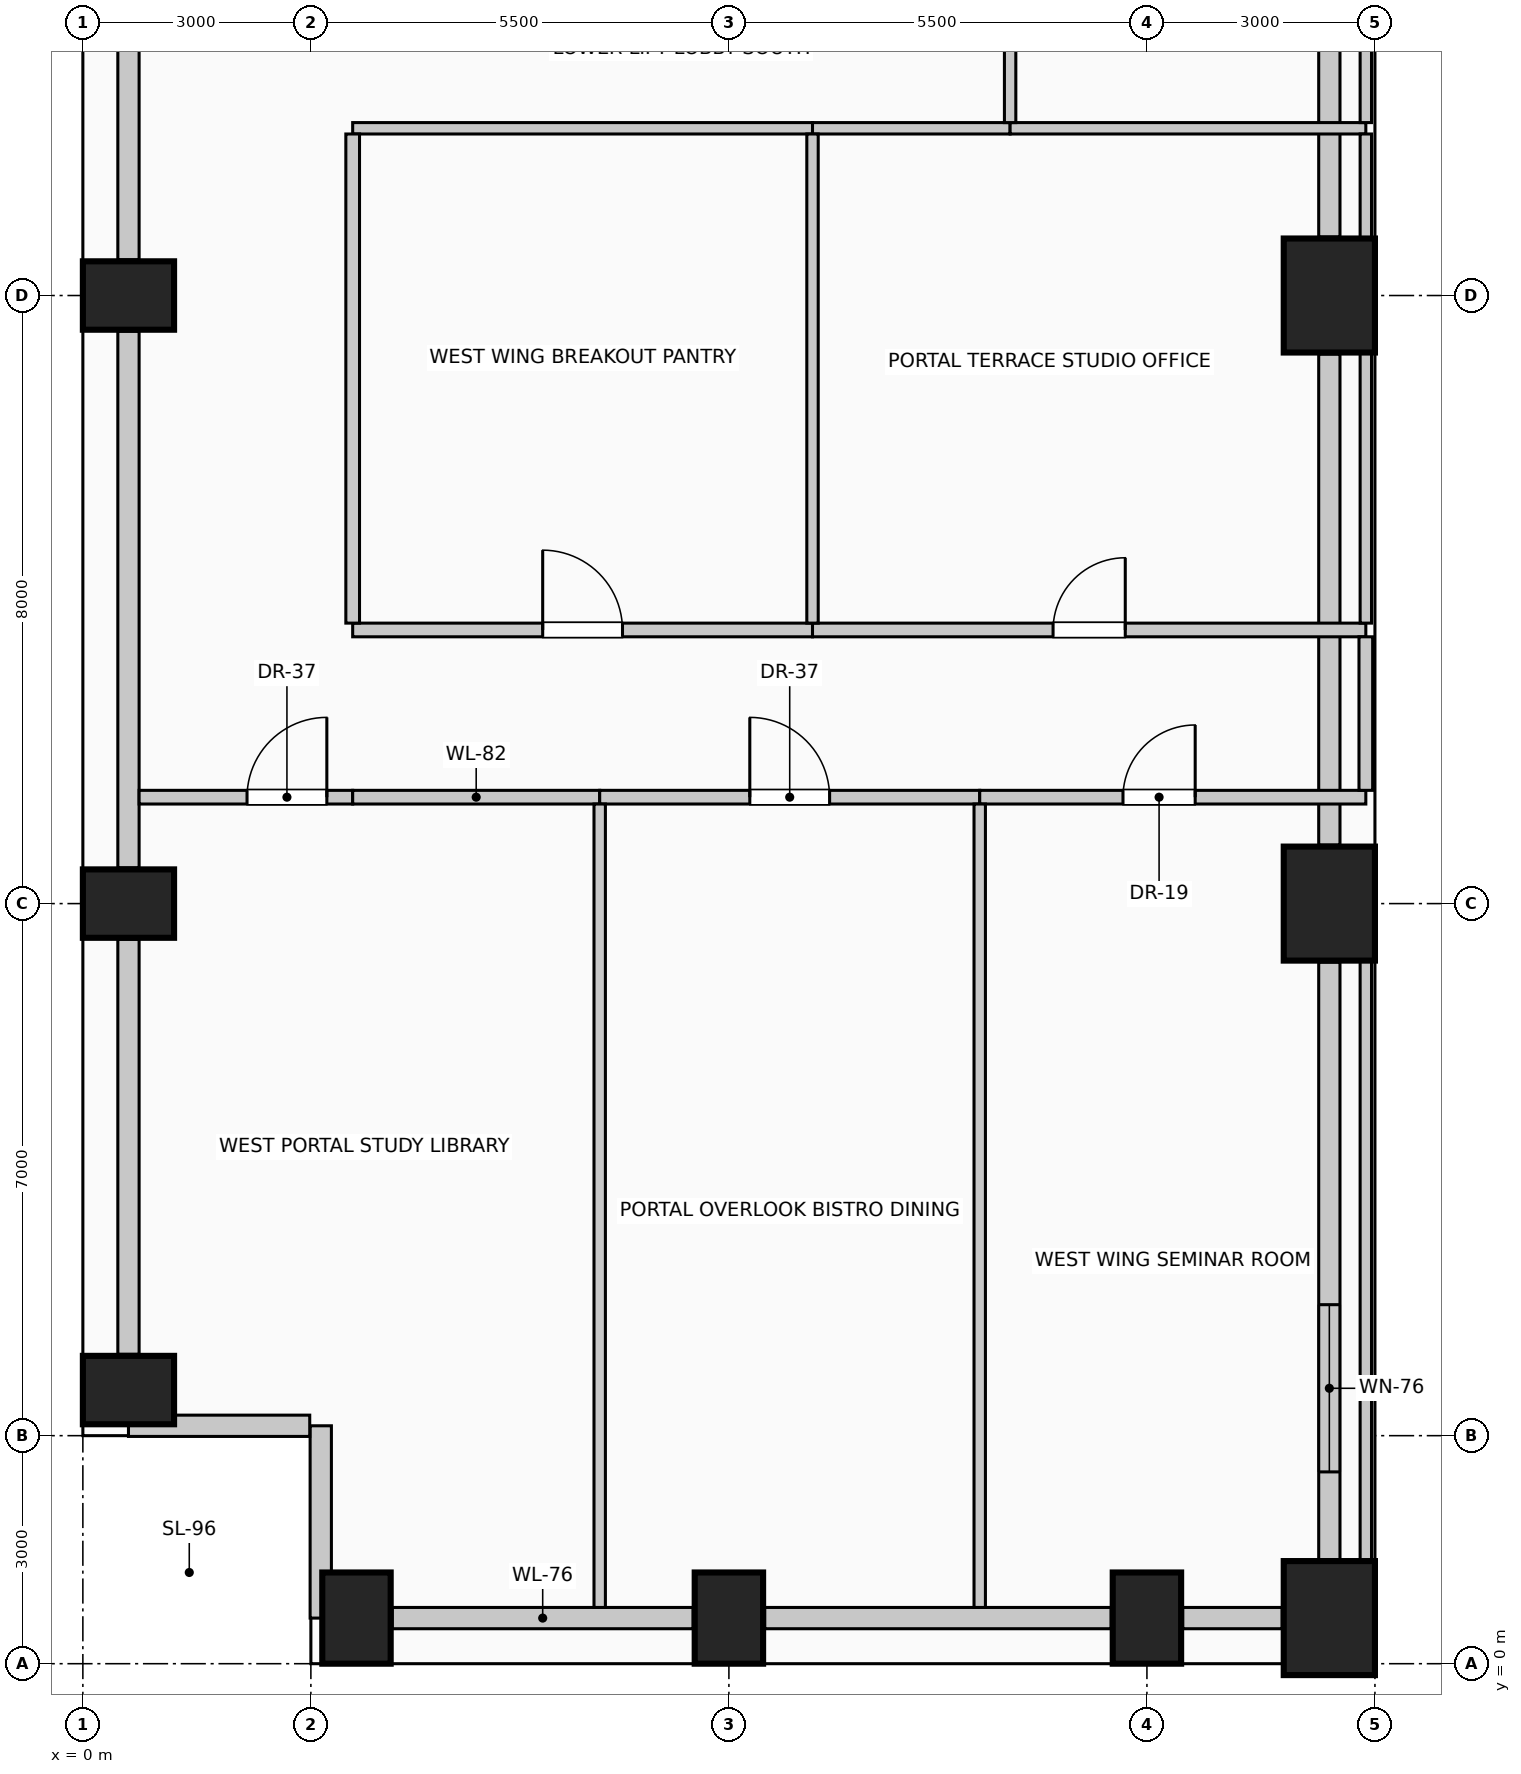
"""IFC4 building model, lengths in metres.
Left out: names, types, materials, properties, quantities, classifications, styles, units other than length and angle.
Written with IfcOpenShell. Run it as: python <this file> out.ifc"""

import sys

from ifc_helpers import new_model, si_unit, direction, frame, frame_2d, origin, origin_2d, place, context, subcontext, project, spatial, rectangle, extrude, element, fill, save


model = new_model("IFC4")
c1 = context("Model", 3, precision=1e-05, world=origin(), true_north=direction((0.0, 1.0)))
c2 = subcontext(c1, "Body", "Model", "MODEL_VIEW")
j1 = project(units=[si_unit("LENGTHUNIT", "METRE"), si_unit("PLANEANGLEUNIT", "RADIAN")], contexts=[c1])
p1 = place(None, origin())
s1 = spatial("IfcSite", under=j1, at=p1, CompositionType="ELEMENT")
p2 = place(p1, origin())
s2 = spatial("IfcBuilding", under=s1, at=p2, CompositionType="ELEMENT")
p3 = place(p2, frame((0.0, 0.0, 34.6)))
s3 = spatial("IfcBuildingStorey", under=s2, at=p3, CompositionType="ELEMENT", Elevation=34.6)
for number, where, z_axis, x_axis in (
    (1, (3.6, 0.6, 0.0), (0.0, 0.0, 1.0), (1.0, 0.0, 0.0)),
    (2, (8.5, 0.6, 0.0), (0.0, 0.0, 1.0), (1.0, 0.0, 0.0)),
    (3, (14.0, 0.6, 0.0), (0.0, 0.0, 1.0), (1.0, 0.0, 0.0)),
):
    element("IfcColumn", number, at=place(p3, frame(where, z_axis=z_axis, x_axis=x_axis)), inside=s3, PredefinedType="COLUMN", context=c2, shape_type="SweptSolid", body=[
        extrude(rectangle(XDim=0.9, YDim=1.2, at=origin_2d()), origin(), (0.0, 0.0, 1.0), 4.0),
    ])
p4 = place(p3, frame((16.4, 0.6, 0.0), z_axis=(0.0, 0.0, 1.0), x_axis=(1.0, 0.0, 0.0)))
e4 = element("IfcColumn", 4, at=p4, inside=s3, PredefinedType="COLUMN", context=c2, shape_type="SweptSolid", body=[
    extrude(rectangle(XDim=1.2, YDim=1.5, at=origin_2d()), origin(), (0.0, 0.0, 1.0), 4.0),
])
for number, where, z_axis, x_axis in (
    (5, (0.6, 3.6, 0.0), (0.0, 0.0, 1.0), (0.0, 1.0, 0.0)),
    (6, (0.6, 10.0, 0.0), (0.0, 0.0, 1.0), (0.0, 1.0, 0.0)),
    (7, (0.6, 18.0, 0.0), (0.0, 0.0, 1.0), (0.0, 1.0, 0.0)),
):
    element("IfcColumn", number, at=place(p3, frame(where, z_axis=z_axis, x_axis=x_axis)), inside=s3, PredefinedType="COLUMN", context=c2, shape_type="SweptSolid", body=[
        extrude(rectangle(XDim=0.9, YDim=1.2, at=origin_2d()), origin(), (0.0, 0.0, 1.0), 4.0),
    ])
for number, where, z_axis, x_axis in (
    (8, (16.4, 10.0, 0.0), (0.0, 0.0, 1.0), (1.0, 0.0, 0.0)),
    (9, (16.4, 18.0, 0.0), (0.0, 0.0, 1.0), (1.0, 0.0, 0.0)),
):
    element("IfcColumn", number, at=place(p3, frame(where, z_axis=z_axis, x_axis=x_axis)), inside=s3, PredefinedType="COLUMN", context=c2, shape_type="SweptSolid", body=[
        extrude(rectangle(XDim=1.2, YDim=1.5, at=origin_2d()), origin(), (0.0, 0.0, 1.0), 4.0),
    ])
p5 = place(p3, frame((8.03, 0.6, 0.0), z_axis=(0.0, 0.0, 1.0), x_axis=(-1.0, 0.0, 0.0)))
e10 = element("IfcWall", 10, at=p5, inside=s3, PredefinedType="SOLIDWALL", context=c2, shape_type="SweptSolid", body=[
    extrude(rectangle(XDim=3.96, YDim=0.28, at=frame_2d((1.98, 0.0))), origin(), (0.0, 0.0, 1.0), 2.85),
])
p6 = place(p3, frame((13.53, 0.6, 0.0), z_axis=(0.0, 0.0, 1.0), x_axis=(-1.0, 0.0, 0.0)))
e11 = element("IfcWall", 11, at=p6, inside=s3, PredefinedType="SOLIDWALL", context=c2, shape_type="SweptSolid", body=[
    extrude(rectangle(XDim=4.56, YDim=0.28, at=frame_2d((2.28, 0.0))), origin(), (0.0, 0.0, 1.0), 2.85),
])
p7 = place(p3, frame((15.78, 0.6, 0.0), z_axis=(0.0, 0.0, 1.0), x_axis=(-1.0, 0.0, 0.0)))
e12 = element("IfcWall", 12, at=p7, inside=s3, PredefinedType="SOLIDWALL", context=c2, shape_type="SweptSolid", body=[
    extrude(rectangle(XDim=1.31, YDim=0.28, at=frame_2d((0.655, 0.0))), origin(), (0.0, 0.0, 1.0), 2.85),
])
p8 = place(p3, frame((0.6, 4.07, 0.0), z_axis=(0.0, 0.0, 1.0), x_axis=(0.0, 1.0, 0.0)))
e13 = element("IfcWall", 13, at=p8, inside=s3, PredefinedType="SOLIDWALL", context=c2, shape_type="SweptSolid", body=[
    extrude(rectangle(XDim=5.46, YDim=0.28, at=frame_2d((2.73, 0.0))), origin(), (0.0, 0.0, 1.0), 2.85),
])
for number, where, z_axis, x_axis in (
    (14, (0.6, 10.47, 0.0), (0.0, 0.0, 1.0), (0.0, 1.0, 0.0)),
    (15, (0.6, 18.47, 0.0), (0.0, 0.0, 1.0), (0.0, 1.0, 0.0)),
):
    element("IfcWall", number, at=place(p3, frame(where, z_axis=z_axis, x_axis=x_axis)), inside=s3, PredefinedType="SOLIDWALL", context=c2, shape_type="SweptSolid", body=[
        extrude(rectangle(XDim=7.06, YDim=0.28, at=frame_2d((3.53, 0.0))), origin(), (0.0, 0.0, 1.0), 2.85),
    ])
p9 = place(p3, frame((3.13, 0.6, 0.0), z_axis=(0.0, 0.0, 1.0), x_axis=(0.0, 1.0, 0.0)))
e16 = element("IfcWall", 16, at=p9, inside=s3, PredefinedType="SOLIDWALL", context=c2, shape_type="SweptSolid", body=[
    extrude(rectangle(XDim=2.53, YDim=0.28, at=frame_2d((1.265, 0.0))), origin(), (0.0, 0.0, 1.0), 3.7),
])
p10 = place(p3, frame((2.985, 3.13, 0.0), z_axis=(0.0, 0.0, 1.0), x_axis=(-1.0, 0.0, 0.0)))
e17 = element("IfcWall", 17, at=p10, inside=s3, PredefinedType="SOLIDWALL", context=c2, shape_type="SweptSolid", body=[
    extrude(rectangle(XDim=2.385, YDim=0.28, at=frame_2d((1.192, 0.0))), origin(), (0.0, 0.0, 1.0), 3.7),
])
p11 = place(p3, frame((16.4, 9.23, 0.0), z_axis=(0.0, 0.0, 1.0), x_axis=(0.0, -1.0, 0.0)))
e18 = element("IfcWall", 18, at=p11, inside=s3, PredefinedType="SOLIDWALL", context=c2, shape_type="SweptSolid", body=[
    extrude(rectangle(XDim=7.86, YDim=0.28, at=frame_2d((3.93, 0.0))), origin(), (0.0, 0.0, 1.0), 3.0),
])
p12 = place(p11, frame((4.507, 0.0, 0.42)))
e19 = element("IfcOpeningElement", 19, at=p12, cuts=e18, PredefinedType="OPENING", context=c2, shape_type="SweptSolid", body=[
    extrude(rectangle(XDim=2.2, YDim=1.95, at=frame_2d((1.1, 0.975))), frame((0.0, 0.15, 0.0), z_axis=(0.0, -1.0, 0.0), x_axis=(1.0, 0.0, 0.0)), (0.0, 0.0, 1.0), 0.3),
])
for number, where, z_axis, x_axis in (
    (20, (16.4, 17.23, 0.0), (0.0, 0.0, 1.0), (0.0, -1.0, 0.0)),
    (21, (16.4, 25.23, 0.0), (0.0, 0.0, 1.0), (0.0, -1.0, 0.0)),
):
    element("IfcWall", number, at=place(p3, frame(where, z_axis=z_axis, x_axis=x_axis)), inside=s3, PredefinedType="SOLIDWALL", context=c2, shape_type="SweptSolid", body=[
        extrude(rectangle(XDim=6.46, YDim=0.28, at=frame_2d((3.23, 0.0))), origin(), (0.0, 0.0, 1.0), 3.0),
    ])
p13 = place(p3, frame((0.74, 11.4, 0.0), z_axis=(0.0, 0.0, 1.0), x_axis=(1.0, 0.0, 0.0)))
e22 = element("IfcWall", 22, at=p13, inside=s3, PredefinedType="PARTITIONING", context=c2, shape_type="SweptSolid", body=[
    extrude(rectangle(XDim=2.81, YDim=0.18, at=frame_2d((1.405, 0.0))), origin(), (0.0, 0.0, 1.0), 3.095),
])
p14 = place(p13, frame((1.42, 0.0, 0.0)))
e23 = element("IfcOpeningElement", 23, at=p14, cuts=e22, PredefinedType="OPENING", context=c2, shape_type="SweptSolid", body=[
    extrude(rectangle(XDim=1.05, YDim=2.15, at=frame_2d((0.525, 1.075))), frame((0.0, 0.1, 0.0), z_axis=(0.0, -1.0, 0.0), x_axis=(1.0, 0.0, 0.0)), (0.0, 0.0, 1.0), 0.2),
])
p15 = place(p3, frame((3.55, 11.4, 0.0), z_axis=(0.0, 0.0, 1.0), x_axis=(1.0, 0.0, 0.0)))
e24 = element("IfcWall", 24, at=p15, inside=s3, PredefinedType="PARTITIONING", context=c2, shape_type="SweptSolid", body=[
    extrude(rectangle(XDim=3.25, YDim=0.18, at=frame_2d((1.625, 0.0))), origin(), (0.0, 0.0, 1.0), 3.095),
])
p16 = place(p3, frame((6.8, 11.4, 0.0), z_axis=(0.0, 0.0, 1.0), x_axis=(1.0, 0.0, 0.0)))
e25 = element("IfcWall", 25, at=p16, inside=s3, PredefinedType="PARTITIONING", context=c2, shape_type="SweptSolid", body=[
    extrude(rectangle(XDim=5.0, YDim=0.18, at=frame_2d((2.5, 0.0))), origin(), (0.0, 0.0, 1.0), 3.095),
])
p17 = place(p16, frame((1.975, 0.0, 0.0)))
e26 = element("IfcOpeningElement", 26, at=p17, cuts=e25, PredefinedType="OPENING", context=c2, shape_type="SweptSolid", body=[
    extrude(rectangle(XDim=1.05, YDim=2.15, at=frame_2d((0.525, 1.075))), frame((0.0, 0.1, 0.0), z_axis=(0.0, -1.0, 0.0), x_axis=(1.0, 0.0, 0.0)), (0.0, 0.0, 1.0), 0.2),
])
p18 = place(p3, frame((11.8, 11.4, 0.0), z_axis=(0.0, 0.0, 1.0), x_axis=(1.0, 0.0, 0.0)))
e27 = element("IfcWall", 27, at=p18, inside=s3, PredefinedType="PARTITIONING", context=c2, shape_type="SweptSolid", body=[
    extrude(rectangle(XDim=5.08, YDim=0.18, at=frame_2d((2.54, 0.0))), origin(), (0.0, 0.0, 1.0), 3.095),
])
p19 = place(p18, frame((1.885, 0.0, 0.0)))
e28 = element("IfcOpeningElement", 28, at=p19, cuts=e27, PredefinedType="OPENING", context=c2, shape_type="SweptSolid", body=[
    extrude(rectangle(XDim=0.95, YDim=2.15, at=frame_2d((0.475, 1.075))), frame((0.0, 0.1, 0.0), z_axis=(0.0, -1.0, 0.0), x_axis=(1.0, 0.0, 0.0)), (0.0, 0.0, 1.0), 0.2),
])
p20 = place(p3, frame((3.55, 13.6, 0.0), z_axis=(0.0, 0.0, 1.0), x_axis=(1.0, 0.0, 0.0)))
e29 = element("IfcWall", 29, at=p20, inside=s3, PredefinedType="PARTITIONING", context=c2, shape_type="SweptSolid", body=[
    extrude(rectangle(XDim=6.05, YDim=0.18, at=frame_2d((3.025, 0.0))), origin(), (0.0, 0.0, 1.0), 3.7),
])
p21 = place(p20, frame((2.5, 0.0, 0.0)))
e30 = element("IfcOpeningElement", 30, at=p21, cuts=e29, PredefinedType="OPENING", context=c2, shape_type="SweptSolid", body=[
    extrude(rectangle(XDim=1.05, YDim=2.15, at=frame_2d((0.525, 1.075))), frame((0.0, 0.1, 0.0), z_axis=(0.0, -1.0, 0.0), x_axis=(1.0, 0.0, 0.0)), (0.0, 0.0, 1.0), 0.2),
])
p22 = place(p3, frame((9.6, 13.6, 0.0), z_axis=(0.0, 0.0, 1.0), x_axis=(1.0, 0.0, 0.0)))
e31 = element("IfcWall", 31, at=p22, inside=s3, PredefinedType="PARTITIONING", context=c2, shape_type="SweptSolid", body=[
    extrude(rectangle(XDim=7.28, YDim=0.18, at=frame_2d((3.64, 0.0))), origin(), (0.0, 0.0, 1.0), 3.7),
])
p23 = place(p22, frame((3.165, 0.0, 0.0)))
e32 = element("IfcOpeningElement", 32, at=p23, cuts=e31, PredefinedType="OPENING", context=c2, shape_type="SweptSolid", body=[
    extrude(rectangle(XDim=0.95, YDim=2.15, at=frame_2d((0.475, 1.075))), frame((0.0, 0.1, 0.0), z_axis=(0.0, -1.0, 0.0), x_axis=(1.0, 0.0, 0.0)), (0.0, 0.0, 1.0), 0.2),
])
p24 = place(p3, frame((3.55, 20.2, 0.0), z_axis=(0.0, 0.0, 1.0), x_axis=(1.0, 0.0, 0.0)))
e33 = element("IfcWall", 33, at=p24, inside=s3, PredefinedType="PARTITIONING", context=c2, shape_type="SweptSolid", body=[
    extrude(rectangle(XDim=6.05, YDim=0.15, at=frame_2d((3.025, 0.0))), origin(), (0.0, 0.0, 1.0), 3.7),
])
p25 = place(p3, frame((9.6, 20.2, 0.0), z_axis=(0.0, 0.0, 1.0), x_axis=(1.0, 0.0, 0.0)))
e34 = element("IfcWall", 34, at=p25, inside=s3, PredefinedType="PARTITIONING", context=c2, shape_type="SweptSolid", body=[
    extrude(rectangle(XDim=2.6, YDim=0.15, at=frame_2d((1.3, 0.0))), origin(), (0.0, 0.0, 1.0), 3.7),
])
p26 = place(p3, frame((12.2, 20.2, 0.0), z_axis=(0.0, 0.0, 1.0), x_axis=(1.0, 0.0, 0.0)))
e35 = element("IfcWall", 35, at=p26, inside=s3, PredefinedType="PARTITIONING", context=c2, shape_type="SweptSolid", body=[
    extrude(rectangle(XDim=4.68, YDim=0.15, at=frame_2d((2.34, 0.0))), origin(), (0.0, 0.0, 1.0), 3.7),
])
p27 = place(p3, frame((3.55, 13.69, 0.0), z_axis=(0.0, 0.0, 1.0), x_axis=(0.0, 1.0, 0.0)))
e36 = element("IfcWall", 36, at=p27, inside=s3, PredefinedType="PARTITIONING", context=c2, shape_type="SweptSolid", body=[
    extrude(rectangle(XDim=6.435, YDim=0.18, at=frame_2d((3.218, 0.0))), origin(), (0.0, 0.0, 1.0), 3.7),
])
p28 = place(p3, frame((6.8, 0.74, 0.0), z_axis=(0.0, 0.0, 1.0), x_axis=(0.0, 1.0, 0.0)))
e37 = element("IfcWall", 37, at=p28, inside=s3, PredefinedType="PARTITIONING", context=c2, shape_type="SweptSolid", body=[
    extrude(rectangle(XDim=10.57, YDim=0.15, at=frame_2d((5.285, 0.0))), origin(), (0.0, 0.0, 1.0), 3.7),
])
p29 = place(p3, frame((9.6, 13.69, 0.0), z_axis=(0.0, 0.0, 1.0), x_axis=(0.0, 1.0, 0.0)))
e38 = element("IfcWall", 38, at=p29, inside=s3, PredefinedType="PARTITIONING", context=c2, shape_type="SweptSolid", body=[
    extrude(rectangle(XDim=6.435, YDim=0.15, at=frame_2d((3.218, 0.0))), origin(), (0.0, 0.0, 1.0), 3.7),
])
p30 = place(p3, frame((11.8, 0.74, 0.0), z_axis=(0.0, 0.0, 1.0), x_axis=(0.0, 1.0, 0.0)))
e39 = element("IfcWall", 39, at=p30, inside=s3, PredefinedType="PARTITIONING", context=c2, shape_type="SweptSolid", body=[
    extrude(rectangle(XDim=10.57, YDim=0.15, at=frame_2d((5.285, 0.0))), origin(), (0.0, 0.0, 1.0), 3.7),
])
p31 = place(p3, frame((12.2, 20.275, 0.0), z_axis=(0.0, 0.0, 1.0), x_axis=(0.0, 1.0, 0.0)))
e40 = element("IfcWall", 40, at=p31, inside=s3, PredefinedType="PARTITIONING", context=c2, shape_type="SweptSolid", body=[
    extrude(rectangle(XDim=1.825, YDim=0.15, at=frame_2d((0.913, 0.0))), origin(), (0.0, 0.0, 1.0), 3.7),
])
p32 = place(p3, frame((16.88, 1.35, 0.0), z_axis=(0.0, 0.0, 1.0), x_axis=(0.0, 1.0, 0.0)))
e41 = element("IfcWall", 41, at=p32, inside=s3, PredefinedType="PARTITIONING", context=c2, shape_type="SweptSolid", body=[
    extrude(rectangle(XDim=7.9, YDim=0.15, at=frame_2d((3.95, 0.0))), origin(), (0.0, 0.0, 1.0), 3.7),
])
p33 = place(p3, frame((16.88, 11.49, 0.0), z_axis=(0.0, 0.0, 1.0), x_axis=(0.0, 1.0, 0.0)))
e42 = element("IfcWall", 42, at=p33, inside=s3, PredefinedType="PARTITIONING", context=c2, shape_type="SweptSolid", body=[
    extrude(rectangle(XDim=2.02, YDim=0.18, at=frame_2d((1.01, 0.0))), origin(), (0.0, 0.0, 1.0), 3.7),
])
p34 = place(p3, frame((16.88, 13.69, 0.0), z_axis=(0.0, 0.0, 1.0), x_axis=(0.0, 1.0, 0.0)))
e43 = element("IfcWall", 43, at=p34, inside=s3, PredefinedType="PARTITIONING", context=c2, shape_type="SweptSolid", body=[
    extrude(rectangle(XDim=3.56, YDim=0.15, at=frame_2d((1.78, 0.0))), origin(), (0.0, 0.0, 1.0), 3.7),
])
p35 = place(p3, frame((16.88, 18.75, 0.0), z_axis=(0.0, 0.0, 1.0), x_axis=(0.0, 1.0, 0.0)))
e44 = element("IfcWall", 44, at=p35, inside=s3, PredefinedType="PARTITIONING", context=c2, shape_type="SweptSolid", body=[
    extrude(rectangle(XDim=1.375, YDim=0.15, at=frame_2d((0.688, 0.0))), origin(), (0.0, 0.0, 1.0), 3.7),
])
p36 = place(p3, frame((16.88, 20.275, 0.0), z_axis=(0.0, 0.0, 1.0), x_axis=(0.0, 1.0, 0.0)))
e45 = element("IfcWall", 45, at=p36, inside=s3, PredefinedType="PARTITIONING", context=c2, shape_type="SweptSolid", body=[
    extrude(rectangle(XDim=4.45, YDim=0.15, at=frame_2d((2.225, 0.0))), origin(), (0.0, 0.0, 1.0), 3.7),
])
p37 = place(p12, origin())
e46 = element("IfcWindow", 46, at=p37, inside=s3, PartitioningType="SINGLE_PANEL", PredefinedType="WINDOW", context=c2, shape_type="SweptSolid", body=[
    extrude(rectangle(XDim=2.2, YDim=1.95, at=frame_2d((1.1, 0.975))), frame((0.0, 0.03, 0.0), z_axis=(0.0, -1.0, 0.0), x_axis=(1.0, 0.0, 0.0)), (0.0, 0.0, 1.0), 0.06),
])
fill(e19, e46)
p38 = place(p14, origin())
e47 = element("IfcDoor", 47, at=p38, inside=s3, OperationType="SINGLE_SWING_RIGHT", PredefinedType="DOOR", context=c2, shape_type="SweptSolid", body=[
    extrude(rectangle(XDim=1.05, YDim=2.15, at=frame_2d((0.525, 1.075))), frame((0.0, 0.025, 0.0), z_axis=(0.0, -1.0, 0.0), x_axis=(1.0, 0.0, 0.0)), (0.0, 0.0, 1.0), 0.05),
])
fill(e23, e47)
p39 = place(p17, origin())
e48 = element("IfcDoor", 48, at=p39, inside=s3, OperationType="SINGLE_SWING_LEFT", PredefinedType="DOOR", context=c2, shape_type="SweptSolid", body=[
    extrude(rectangle(XDim=1.05, YDim=2.15, at=frame_2d((0.525, 1.075))), frame((0.0, 0.025, 0.0), z_axis=(0.0, -1.0, 0.0), x_axis=(1.0, 0.0, 0.0)), (0.0, 0.0, 1.0), 0.05),
])
fill(e26, e48)
p40 = place(p19, origin())
e49 = element("IfcDoor", 49, at=p40, inside=s3, OperationType="SINGLE_SWING_RIGHT", PredefinedType="DOOR", context=c2, shape_type="SweptSolid", body=[
    extrude(rectangle(XDim=0.95, YDim=2.15, at=frame_2d((0.475, 1.075))), frame((0.0, 0.025, 0.0), z_axis=(0.0, -1.0, 0.0), x_axis=(1.0, 0.0, 0.0)), (0.0, 0.0, 1.0), 0.05),
])
fill(e28, e49)
p41 = place(p21, origin())
e50 = element("IfcDoor", 50, at=p41, inside=s3, OperationType="SINGLE_SWING_LEFT", PredefinedType="DOOR", context=c2, shape_type="SweptSolid", body=[
    extrude(rectangle(XDim=1.05, YDim=2.15, at=frame_2d((0.525, 1.075))), frame((0.0, 0.025, 0.0), z_axis=(0.0, -1.0, 0.0), x_axis=(1.0, 0.0, 0.0)), (0.0, 0.0, 1.0), 0.05),
])
fill(e30, e50)
p42 = place(p23, origin())
e51 = element("IfcDoor", 51, at=p42, inside=s3, OperationType="SINGLE_SWING_RIGHT", PredefinedType="DOOR", context=c2, shape_type="SweptSolid", body=[
    extrude(rectangle(XDim=0.95, YDim=2.15, at=frame_2d((0.475, 1.075))), frame((0.0, 0.025, 0.0), z_axis=(0.0, -1.0, 0.0), x_axis=(1.0, 0.0, 0.0)), (0.0, 0.0, 1.0), 0.05),
])
fill(e32, e51)
save(model, sys.argv[1])
